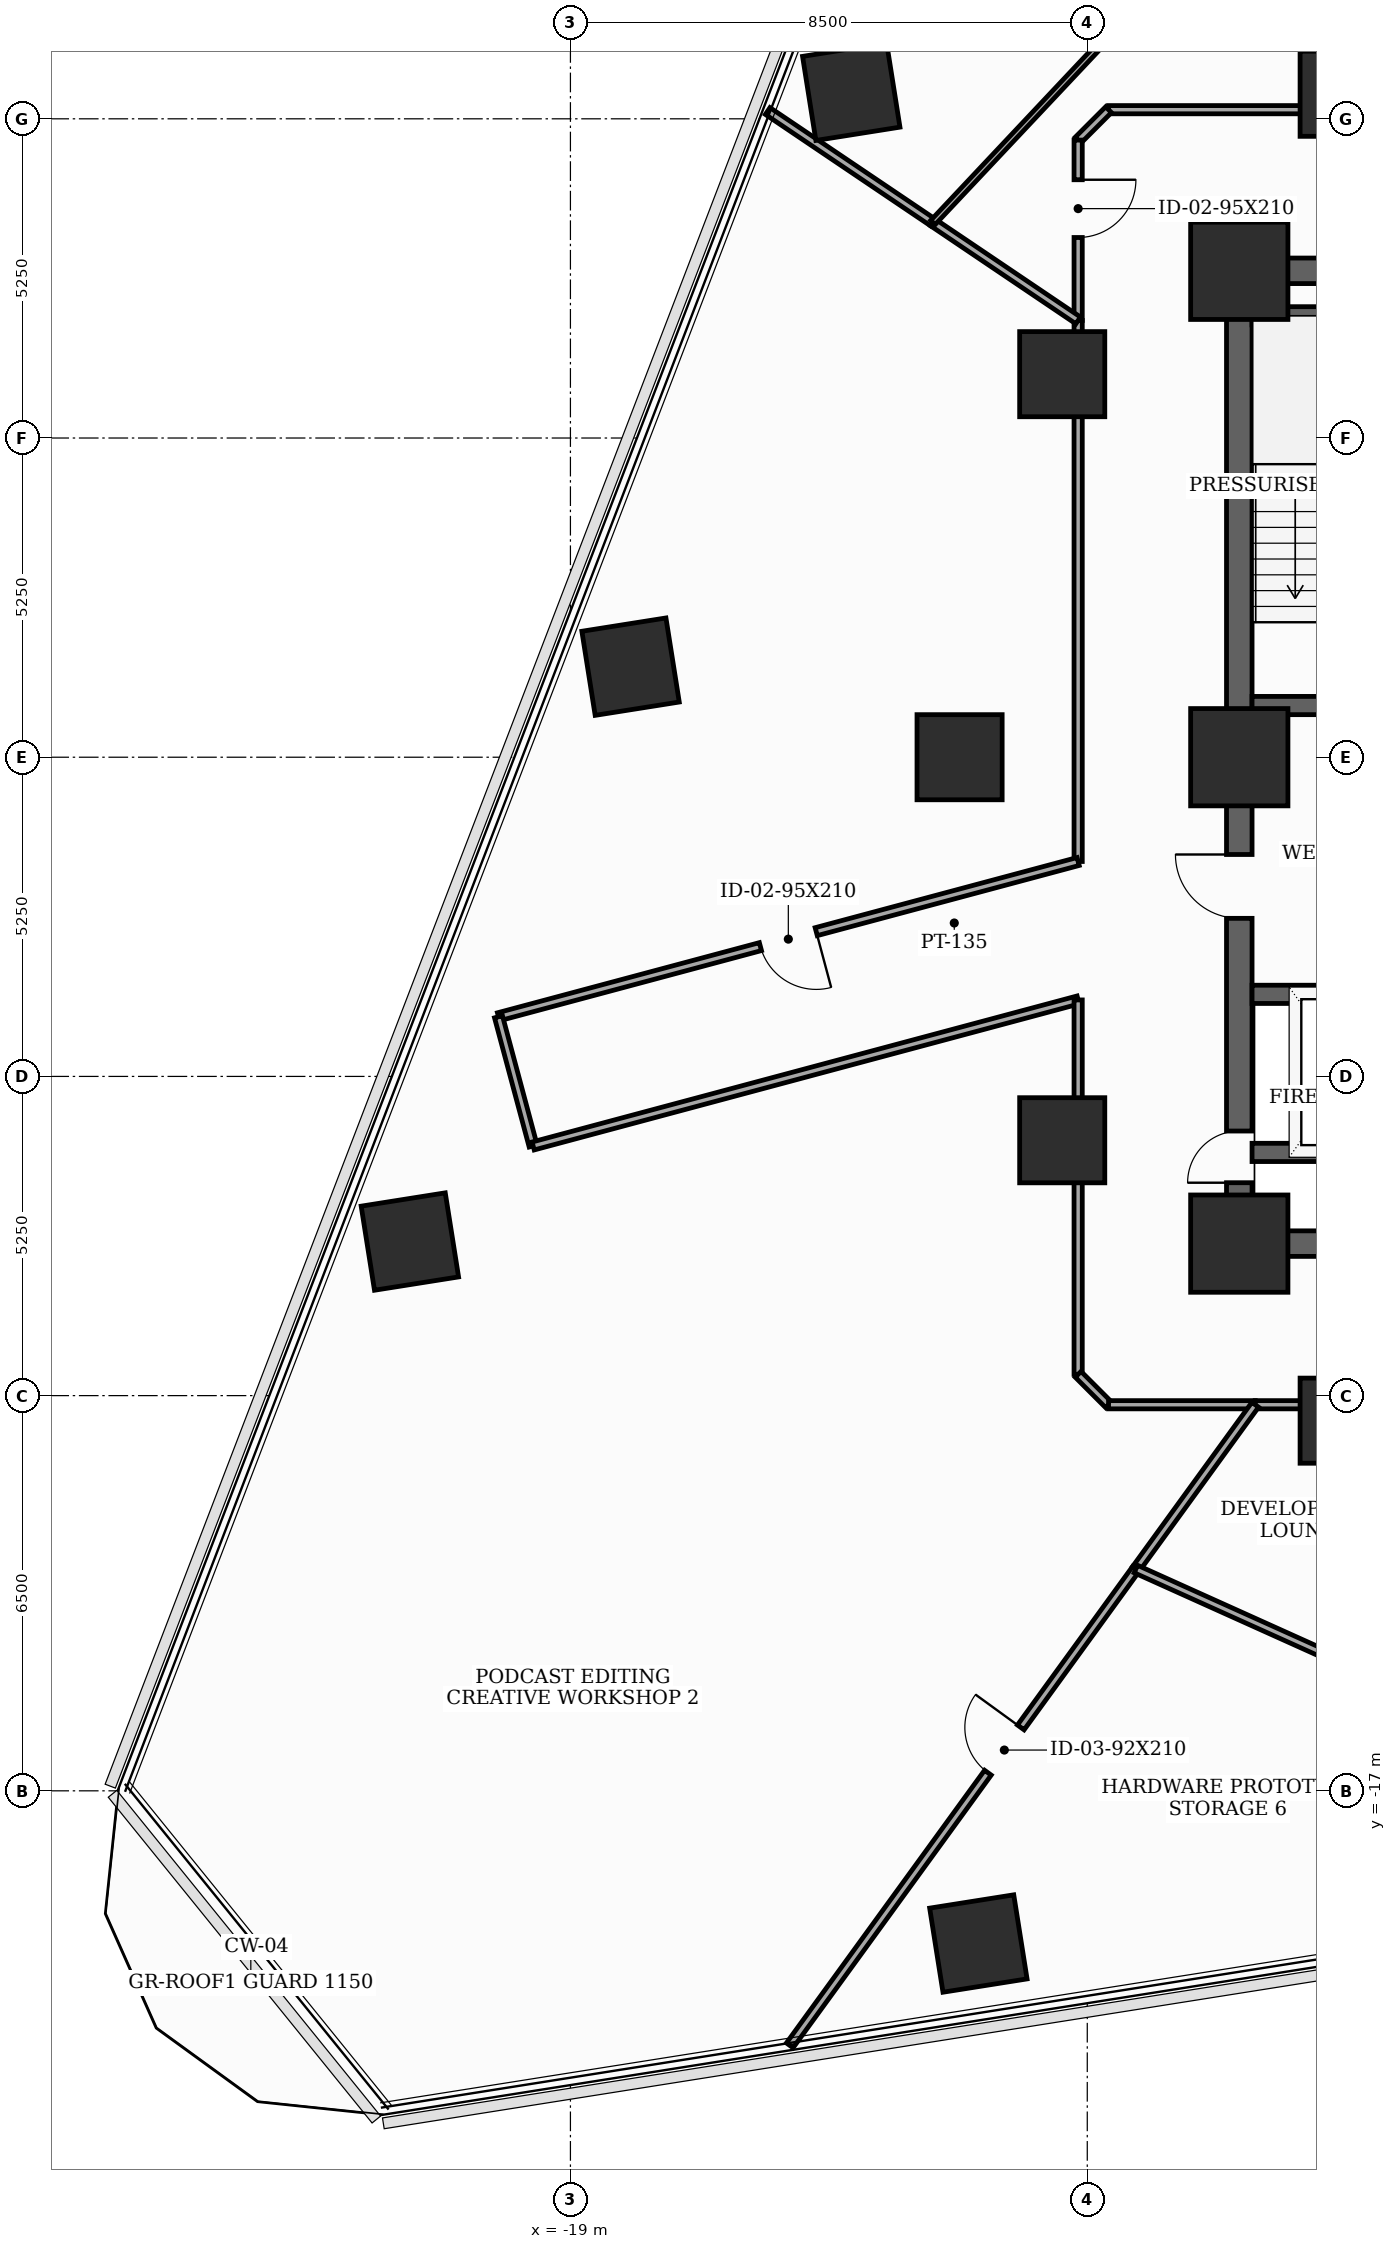
"""IFC4 building model, lengths in metres.
Left out: names, types, materials, properties, quantities, classifications, styles, units other than length and angle.
Written with IfcOpenShell. Run it as: python <this file> out.ifc"""

import sys

from ifc_helpers import new_model, si_unit, direction, frame, frame_2d, origin, origin_2d, place, context, subcontext, project, spatial, rectangle, extrude, element, fill, save


model = new_model("IFC4")
c1 = context("Model", 3, precision=1e-05, world=origin(), true_north=direction((0.0, 1.0)))
c2 = subcontext(c1, "Body", "Model", "MODEL_VIEW")
j1 = project(units=[si_unit("LENGTHUNIT", "METRE"), si_unit("PLANEANGLEUNIT", "RADIAN")], contexts=[c1])
p1 = place(None, origin())
s1 = spatial("IfcSite", under=j1, at=p1, CompositionType="ELEMENT")
p2 = place(p1, origin())
s2 = spatial("IfcBuilding", under=s1, at=p2, CompositionType="ELEMENT")
p3 = place(p2, frame((0.0, 0.0, 55.6)))
s3 = spatial("IfcBuildingStorey", under=s2, at=p3, CompositionType="ELEMENT", Elevation=55.6)
for number, where, z_axis, x_axis in (
    (1, (-8.0, -8.0, 0.0), (0.0, 0.0, 1.0), (1.0, 0.0, 0.0)),
    (2, (-8.0, 8.0, 0.0), (0.0, 0.0, 1.0), (1.0, 0.0, 0.0)),
    (3, (-8.0, 0.0, 0.0), (0.0, 0.0, 1.0), (1.0, 0.0, 0.0)),
):
    element("IfcColumn", number, at=place(p3, frame(where, z_axis=z_axis, x_axis=x_axis)), inside=s3, PredefinedType="COLUMN", context=c2, shape_type="SweptSolid", body=[
        extrude(rectangle(XDim=1.6, YDim=1.6, at=origin_2d()), origin(), (0.0, 0.0, 1.0), 3.7),
    ])
for number, where, z_axis, x_axis in (
    (4, (-6.3, 10.912, 0.0), (0.0, 0.0, 1.0), (1.0, 0.0, 0.0)),
    (5, (-10.912, 6.3, 0.0), (0.0, 0.0, 1.0), (1.0, 0.0, 0.0)),
    (6, (-12.6, 0.0, 0.0), (0.0, 0.0, 1.0), (1.0, 0.0, 0.0)),
    (7, (-10.912, -6.3, 0.0), (0.0, 0.0, 1.0), (1.0, 0.0, 0.0)),
    (8, (-6.3, -10.912, 0.0), (0.0, 0.0, 1.0), (1.0, 0.0, 0.0)),
    (9, (-12.291, -19.511, 0.0), (0.0, 0.0, 1.0), (0.988, 0.156, 0.0)),
    (10, (-14.381, 10.945, 0.0), (0.0, 0.0, 1.0), (0.988, 0.156, 0.0)),
    (11, (-18.011, 1.49, 0.0), (0.0, 0.0, 1.0), (0.988, 0.156, 0.0)),
    (12, (-21.641, -7.966, 0.0), (0.0, 0.0, 1.0), (0.988, 0.156, 0.0)),
):
    element("IfcColumn", number, at=place(p3, frame(where, z_axis=z_axis, x_axis=x_axis)), inside=s3, PredefinedType="COLUMN", context=c2, shape_type="SweptSolid", body=[
        extrude(rectangle(XDim=1.4, YDim=1.4, at=origin_2d()), origin(), (0.0, 0.0, 1.0), 3.7),
    ])
p4 = place(p3, frame((-8.0, -8.0, 0.0), z_axis=(0.0, 0.0, 1.0), x_axis=(0.0, 1.0, 0.0)))
e13 = element("IfcWall", 13, at=p4, inside=s3, PredefinedType="SHEAR", context=c2, shape_type="SweptSolid", body=[
    extrude(rectangle(XDim=16.0, YDim=0.42, at=frame_2d((8.0, 0.0))), origin(), (0.0, 0.0, 1.0), 3.5),
])
p5 = place(p4, frame((1.002, 0.0, 0.0)))
e14 = element("IfcOpeningElement", 14, at=p5, cuts=e13, PredefinedType="OPENING", context=c2, shape_type="SweptSolid", body=[
    extrude(rectangle(XDim=0.85, YDim=2.02, at=frame_2d((0.425, 1.01))), frame((0.0, 0.22, 0.0), z_axis=(0.0, -1.0, 0.0), x_axis=(1.0, 0.0, 0.0)), (0.0, 0.0, 1.0), 0.44),
])
p6 = place(p4, frame((5.35, 0.0, 0.0)))
e15 = element("IfcOpeningElement", 15, at=p6, cuts=e13, PredefinedType="OPENING", context=c2, shape_type="SweptSolid", body=[
    extrude(rectangle(XDim=1.05, YDim=2.15, at=frame_2d((0.525, 1.075))), frame((0.0, 0.22, 0.0), z_axis=(0.0, -1.0, 0.0), x_axis=(1.0, 0.0, 0.0)), (0.0, 0.0, 1.0), 0.44),
])
p7 = place(p3, frame((-8.0, -8.0, 0.0), z_axis=(0.0, 0.0, 1.0), x_axis=(1.0, 0.0, 0.0)))
e16 = element("IfcWall", 16, at=p7, inside=s3, PredefinedType="SHEAR", context=c2, shape_type="SweptSolid", body=[
    extrude(rectangle(XDim=16.0, YDim=0.42, at=frame_2d((8.0, 0.0))), origin(), (0.0, 0.0, 1.0), 3.5),
])
p8 = place(p7, frame((7.52, 0.0, 0.0)))
e17 = element("IfcOpeningElement", 17, at=p8, cuts=e16, PredefinedType="OPENING", context=c2, shape_type="SweptSolid", body=[
    extrude(rectangle(XDim=0.95, YDim=2.1, at=frame_2d((0.475, 1.05))), frame((0.0, 0.22, 0.0), z_axis=(0.0, -1.0, 0.0), x_axis=(1.0, 0.0, 0.0)), (0.0, 0.0, 1.0), 0.44),
])
p9 = place(p3, frame((-8.0, 8.0, 0.0), z_axis=(0.0, 0.0, 1.0), x_axis=(1.0, 0.0, 0.0)))
e18 = element("IfcWall", 18, at=p9, inside=s3, PredefinedType="SHEAR", context=c2, shape_type="SweptSolid", body=[
    extrude(rectangle(XDim=16.0, YDim=0.42, at=frame_2d((8.0, 0.0))), origin(), (0.0, 0.0, 1.0), 3.5),
])
p10 = place(p9, frame((7.1, 0.0, 0.0)))
e19 = element("IfcOpeningElement", 19, at=p10, cuts=e18, PredefinedType="OPENING", context=c2, shape_type="SweptSolid", body=[
    extrude(rectangle(XDim=1.8, YDim=2.15, at=frame_2d((0.9, 1.075))), frame((0.0, 0.22, 0.0), z_axis=(0.0, -1.0, 0.0), x_axis=(1.0, 0.0, 0.0)), (0.0, 0.0, 1.0), 0.44),
])
p11 = place(p3, frame((-7.79, 0.85, 0.0), z_axis=(0.0, 0.0, 1.0), x_axis=(1.0, 0.0, 0.0)))
e20 = element("IfcWall", 20, at=p11, inside=s3, PredefinedType="SHEAR", context=c2, shape_type="SweptSolid", body=[
    extrude(rectangle(XDim=3.34, YDim=0.3, at=frame_2d((1.67, 0.0))), origin(), (0.0, 0.0, 1.0), 3.5),
])
p12 = place(p11, frame((1.85, 0.0, 0.0)))
e21 = element("IfcOpeningElement", 21, at=p12, cuts=e20, PredefinedType="OPENING", context=c2, shape_type="SweptSolid", body=[
    extrude(rectangle(XDim=1.05, YDim=2.15, at=frame_2d((0.525, 1.075))), frame((0.0, 0.16, 0.0), z_axis=(0.0, -1.0, 0.0), x_axis=(1.0, 0.0, 0.0)), (0.0, 0.0, 1.0), 0.32),
])
p13 = place(p3, frame((-7.79, 7.26, 0.0), z_axis=(0.0, 0.0, 1.0), x_axis=(1.0, 0.0, 0.0)))
e22 = element("IfcWall", 22, at=p13, inside=s3, PredefinedType="SHEAR", context=c2, shape_type="SweptSolid", body=[
    extrude(rectangle(XDim=3.34, YDim=0.3, at=frame_2d((1.67, 0.0))), origin(), (0.0, 0.0, 1.0), 3.5),
])
p14 = place(p3, frame((-7.79, -3.9, 0.0), z_axis=(0.0, 0.0, 1.0), x_axis=(1.0, 0.0, 0.0)))
e23 = element("IfcWall", 23, at=p14, inside=s3, PredefinedType="SHEAR", context=c2, shape_type="SweptSolid", body=[
    extrude(rectangle(XDim=3.34, YDim=0.3, at=frame_2d((1.67, 0.0))), origin(), (0.0, 0.0, 1.0), 3.5),
])
p15 = place(p14, frame((1.27, 0.0, 0.0)))
e24 = element("IfcOpeningElement", 24, at=p15, cuts=e23, PredefinedType="OPENING", context=c2, shape_type="SweptSolid", body=[
    extrude(rectangle(XDim=1.1, YDim=2.1, at=frame_2d((0.55, 1.05))), frame((0.0, 0.16, 0.0), z_axis=(0.0, -1.0, 0.0), x_axis=(1.0, 0.0, 0.0)), (0.0, 0.0, 1.0), 0.32),
])
p16 = place(p3, frame((-7.79, -6.5, 0.0), z_axis=(0.0, 0.0, 1.0), x_axis=(1.0, 0.0, 0.0)))
e25 = element("IfcWall", 25, at=p16, inside=s3, PredefinedType="SHEAR", context=c2, shape_type="SweptSolid", body=[
    extrude(rectangle(XDim=3.34, YDim=0.3, at=frame_2d((1.67, 0.0))), origin(), (0.0, 0.0, 1.0), 3.5),
])
p17 = place(p3, frame((-10.65, 7.184, 0.0), z_axis=(0.0, 0.0, 1.0), x_axis=(0.0, -1.0, 0.0)))
e26 = element("IfcWall", 26, at=p17, inside=s3, PredefinedType="PARTITIONING", context=c2, shape_type="SweptSolid", body=[
    extrude(rectangle(XDim=8.899, YDim=0.135, at=frame_2d((4.45, 0.0))), origin(), (0.0, 0.0, 1.0), 2.785),
])
p18 = place(p3, frame((-10.65, -1.715, 0.0), z_axis=(0.0, 0.0, 1.0), x_axis=(-0.965937452198, -0.258775652721, 0.0)))
e27 = element("IfcWall", 27, at=p18, inside=s3, PredefinedType="PARTITIONING", context=c2, shape_type="SweptSolid", body=[
    extrude(rectangle(XDim=9.869, YDim=0.135, at=frame_2d((4.935, 0.0))), origin(), (0.0, 0.0, 1.0), 2.785),
])
p19 = place(p18, frame((4.46, 0.0, 0.0)))
e28 = element("IfcOpeningElement", 28, at=p19, cuts=e27, PredefinedType="OPENING", context=c2, shape_type="SweptSolid", body=[
    extrude(rectangle(XDim=0.95, YDim=2.1, at=frame_2d((0.475, 1.05))), frame((0.0, 0.077, 0.0), z_axis=(0.0, -1.0, 0.0), x_axis=(1.0, 0.0, 0.0)), (0.0, 0.0, 1.0), 0.155),
])
p20 = place(p3, frame((-20.183, -4.269, 0.0), z_axis=(0.0, 0.0, 1.0), x_axis=(0.259105843213, -0.965848933329, 0.0)))
e29 = element("IfcWall", 29, at=p20, inside=s3, PredefinedType="PARTITIONING", context=c2, shape_type="SweptSolid", body=[
    extrude(rectangle(XDim=2.2, YDim=0.135, at=frame_2d((1.1, 0.0))), origin(), (0.0, 0.0, 1.0), 2.935),
])
p21 = place(p3, frame((-19.613, -6.394, 0.0), z_axis=(0.0, 0.0, 1.0), x_axis=(0.96591410887, 0.258862771148, 0.0)))
e30 = element("IfcWall", 30, at=p21, inside=s3, PredefinedType="PARTITIONING", context=c2, shape_type="SweptSolid", body=[
    extrude(rectangle(XDim=9.28, YDim=0.135, at=frame_2d((4.64, 0.0))), origin(), (0.0, 0.0, 1.0), 2.785),
])
p22 = place(p3, frame((-10.65, -3.992, 0.0), z_axis=(0.0, 0.0, 1.0), x_axis=(0.0, -1.0, 0.0)))
e31 = element("IfcWall", 31, at=p22, inside=s3, PredefinedType="PARTITIONING", context=c2, shape_type="SweptSolid", body=[
    extrude(rectangle(XDim=6.158, YDim=0.135, at=frame_2d((3.079, 0.0))), origin(), (0.0, 0.0, 1.0), 2.785),
])
p23 = place(p3, frame((-10.65, -10.15, 0.0), z_axis=(0.0, 0.0, 1.0), x_axis=(0.707106781187, -0.707106781187, 0.0)))
e32 = element("IfcWall", 32, at=p23, inside=s3, PredefinedType="PARTITIONING", context=c2, shape_type="SweptSolid", body=[
    extrude(rectangle(XDim=0.707, YDim=0.135, at=frame_2d((0.354, 0.0))), origin(), (0.0, 0.0, 1.0), 3.5),
])
p24 = place(p3, frame((-10.15, -10.65, 0.0), z_axis=(0.0, 0.0, 1.0), x_axis=(1.0, 0.0, 0.0)))
e33 = element("IfcWall", 33, at=p24, inside=s3, PredefinedType="PARTITIONING", context=c2, shape_type="SweptSolid", body=[
    extrude(rectangle(XDim=2.412, YDim=0.135, at=frame_2d((1.206, 0.0))), origin(), (0.0, 0.0, 1.0), 3.5),
])
p25 = place(p3, frame((-7.738, -10.65, 0.0), z_axis=(0.0, 0.0, 1.0), x_axis=(1.0, 0.0, 0.0)))
e34 = element("IfcWall", 34, at=p25, inside=s3, PredefinedType="PARTITIONING", context=c2, shape_type="SweptSolid", body=[
    extrude(rectangle(XDim=2.888, YDim=0.135, at=frame_2d((1.444, 0.0))), origin(), (0.0, 0.0, 1.0), 2.785),
])
p26 = place(p3, frame((-3.054, 10.65, 0.0), z_axis=(0.0, 0.0, 1.0), x_axis=(-1.0, 0.0, 0.0)))
e35 = element("IfcWall", 35, at=p26, inside=s3, PredefinedType="PARTITIONING", context=c2, shape_type="SweptSolid", body=[
    extrude(rectangle(XDim=7.096, YDim=0.135, at=frame_2d((3.548, 0.0))), origin(), (0.0, 0.0, 1.0), 2.785),
])
p27 = place(p3, frame((-10.15, 10.65, 0.0), z_axis=(0.0, 0.0, 1.0), x_axis=(-0.707106781187, -0.707106781187, 0.0)))
e36 = element("IfcWall", 36, at=p27, inside=s3, PredefinedType="PARTITIONING", context=c2, shape_type="SweptSolid", body=[
    extrude(rectangle(XDim=0.707, YDim=0.135, at=frame_2d((0.354, 0.0))), origin(), (0.0, 0.0, 1.0), 3.5),
])
p28 = place(p3, frame((-10.65, 10.15, 0.0), z_axis=(0.0, 0.0, 1.0), x_axis=(0.0, -1.0, 0.0)))
e37 = element("IfcWall", 37, at=p28, inside=s3, PredefinedType="PARTITIONING", context=c2, shape_type="SweptSolid", body=[
    extrude(rectangle(XDim=2.966, YDim=0.135, at=frame_2d((1.483, 0.0))), origin(), (0.0, 0.0, 1.0), 3.5),
])
p29 = place(p28, frame((0.652, 0.0, 0.0)))
e38 = element("IfcOpeningElement", 38, at=p29, cuts=e37, PredefinedType="OPENING", context=c2, shape_type="SweptSolid", body=[
    extrude(rectangle(XDim=0.95, YDim=2.1, at=frame_2d((0.475, 1.05))), frame((0.0, 0.077, 0.0), z_axis=(0.0, -1.0, 0.0), x_axis=(1.0, 0.0, 0.0)), (0.0, 0.0, 1.0), 0.155),
])
p30 = place(p3, frame((-15.393, -21.187, 0.0), z_axis=(0.0, 0.0, 1.0), x_axis=(0.587736917223, 0.809052109653, 0.0)))
e39 = element("IfcWall", 39, at=p30, inside=s3, PredefinedType="PARTITIONING", context=c2, shape_type="SweptSolid", body=[
    extrude(rectangle(XDim=9.684, YDim=0.135, at=frame_2d((4.842, 0.0))), origin(), (0.0, 0.0, 1.0), 2.935),
])
p31 = place(p30, frame((5.544, 0.0, 0.0)))
e40 = element("IfcOpeningElement", 40, at=p31, cuts=e39, PredefinedType="OPENING", context=c2, shape_type="SweptSolid", body=[
    extrude(rectangle(XDim=0.92, YDim=2.1, at=frame_2d((0.46, 1.05))), frame((0.0, 0.077, 0.0), z_axis=(0.0, -1.0, 0.0), x_axis=(1.0, 0.0, 0.0)), (0.0, 0.0, 1.0), 0.155),
])
p32 = place(p3, frame((-9.701, -13.352, 0.0), z_axis=(0.0, 0.0, 1.0), x_axis=(0.587719574609, 0.809064707932, 0.0)))
e41 = element("IfcWall", 41, at=p32, inside=s3, PredefinedType="PARTITIONING", context=c2, shape_type="SweptSolid", body=[
    extrude(rectangle(XDim=3.34, YDim=0.135, at=frame_2d((1.67, 0.0))), origin(), (0.0, 0.0, 1.0), 3.5),
])
p33 = place(p3, frame((-13.038, 8.795, 0.0), z_axis=(0.0, 0.0, 1.0), x_axis=(-0.829071326064, 0.559142858578, 0.0)))
e42 = element("IfcWall", 42, at=p33, inside=s3, PredefinedType="PARTITIONING", context=c2, shape_type="SweptSolid", body=[
    extrude(rectangle(XDim=3.279, YDim=0.135, at=frame_2d((1.639, 0.0))), origin(), (0.0, 0.0, 1.0), 2.785),
])
p34 = place(p3, frame((-10.65, 7.184, 0.0), z_axis=(0.0, 0.0, 1.0), x_axis=(-0.829039234985, 0.559190438809, 0.0)))
e43 = element("IfcWall", 43, at=p34, inside=s3, PredefinedType="PARTITIONING", context=c2, shape_type="SweptSolid", body=[
    extrude(rectangle(XDim=2.881, YDim=0.135, at=frame_2d((1.44, 0.0))), origin(), (0.0, 0.0, 1.0), 2.785),
])
p35 = place(p3, frame((-3.167, -16.295, 0.0), z_axis=(0.0, 0.0, 1.0), x_axis=(-0.911785675506, 0.410666387645, 0.0)))
e44 = element("IfcWall", 44, at=p35, inside=s3, PredefinedType="PARTITIONING", context=c2, shape_type="SweptSolid", body=[
    extrude(rectangle(XDim=7.166, YDim=0.135, at=frame_2d((3.583, 0.0))), origin(), (0.0, 0.0, 1.0), 2.785),
])
p36 = place(p3, frame((-13.038, 8.795, 0.0), z_axis=(0.0, 0.0, 1.0), x_axis=(0.685214439986, 0.728341383716, 0.0)))
e45 = element("IfcWall", 45, at=p36, inside=s3, PredefinedType="MOVABLE", context=c2, shape_type="SweptSolid", body=[
    extrude(rectangle(XDim=5.474, YDim=0.1, at=frame_2d((2.737, 0.0))), origin(), (0.0, 0.0, 1.0), 2.785),
])
p37 = place(p5, origin())
e46 = element("IfcDoor", 46, at=p37, inside=s3, OperationType="SINGLE_SWING_LEFT", PredefinedType="TRAPDOOR", context=c2, shape_type="SweptSolid", body=[
    extrude(rectangle(XDim=0.85, YDim=2.02, at=frame_2d((0.425, 1.01))), frame((0.0, 0.025, 0.0), z_axis=(0.0, -1.0, 0.0), x_axis=(1.0, 0.0, 0.0)), (0.0, 0.0, 1.0), 0.05),
])
fill(e14, e46)
p38 = place(p6, origin())
e47 = element("IfcDoor", 47, at=p38, inside=s3, OperationType="SINGLE_SWING_RIGHT", PredefinedType="DOOR", context=c2, shape_type="SweptSolid", body=[
    extrude(rectangle(XDim=1.05, YDim=2.15, at=frame_2d((0.525, 1.075))), frame((0.0, 0.025, 0.0), z_axis=(0.0, -1.0, 0.0), x_axis=(1.0, 0.0, 0.0)), (0.0, 0.0, 1.0), 0.05),
])
fill(e15, e47)
p39 = place(p19, origin())
e48 = element("IfcDoor", 48, at=p39, inside=s3, OperationType="SINGLE_SWING_LEFT", PredefinedType="DOOR", context=c2, shape_type="SweptSolid", body=[
    extrude(rectangle(XDim=0.95, YDim=2.1, at=frame_2d((0.475, 1.05))), frame((0.0, 0.025, 0.0), z_axis=(0.0, -1.0, 0.0), x_axis=(1.0, 0.0, 0.0)), (0.0, 0.0, 1.0), 0.05),
])
fill(e28, e48)
p40 = place(p29, origin())
e49 = element("IfcDoor", 49, at=p40, inside=s3, OperationType="SINGLE_SWING_LEFT", PredefinedType="DOOR", context=c2, shape_type="SweptSolid", body=[
    extrude(rectangle(XDim=0.95, YDim=2.1, at=frame_2d((0.475, 1.05))), frame((0.0, 0.025, 0.0), z_axis=(0.0, -1.0, 0.0), x_axis=(1.0, 0.0, 0.0)), (0.0, 0.0, 1.0), 0.05),
])
fill(e38, e49)
p41 = place(p31, origin())
e50 = element("IfcDoor", 50, at=p41, inside=s3, OperationType="SINGLE_SWING_RIGHT", PredefinedType="DOOR", context=c2, shape_type="SweptSolid", body=[
    extrude(rectangle(XDim=0.92, YDim=2.1, at=frame_2d((0.46, 1.05))), frame((0.0, 0.025, 0.0), z_axis=(0.0, -1.0, 0.0), x_axis=(1.0, 0.0, 0.0)), (0.0, 0.0, 1.0), 0.05),
])
fill(e40, e50)
save(model, sys.argv[1])
